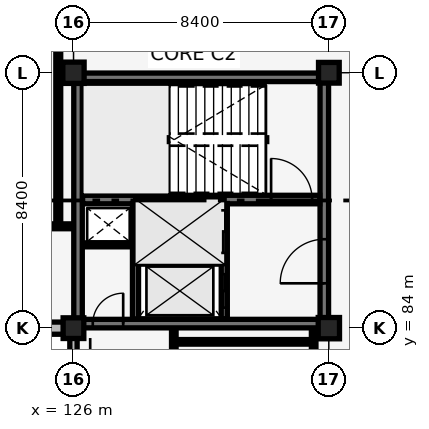
"""IFC4 building model, lengths in metres.
Left out: names, types, materials, properties, quantities, classifications, styles, units other than length and angle.
Written with IfcOpenShell. Run it as: python <this file> out.ifc"""

import sys

from ifc_helpers import new_model, si_unit, direction, frame, frame_2d, origin, origin_2d, place, context, subcontext, project, spatial, rectangle, extrude, element, fill, save


model = new_model("IFC4")
c1 = context("Model", 3, precision=1e-05, world=origin(), true_north=direction((0.0, 1.0)))
c2 = subcontext(c1, "Body", "Model", "MODEL_VIEW")
j1 = project(units=[si_unit("LENGTHUNIT", "METRE"), si_unit("PLANEANGLEUNIT", "RADIAN")], contexts=[c1])
p1 = place(None, origin())
s1 = spatial("IfcSite", under=j1, at=p1, CompositionType="ELEMENT")
p2 = place(p1, origin())
s2 = spatial("IfcBuilding", under=s1, at=p2, CompositionType="ELEMENT")
p3 = place(p2, frame((0.0, 0.0, 9.86)))
s3 = spatial("IfcBuildingStorey", under=s2, at=p3, CompositionType="ELEMENT", Elevation=9.86)
p4 = place(p3, frame((126.15, 84.15, 0.0), z_axis=(0.0, 0.0, 1.0), x_axis=(1.0, 0.0, 0.0)))
e1 = element("IfcWall", 1, at=p4, inside=s3, PredefinedType="SHEAR", context=c2, shape_type="SweptSolid", body=[
    extrude(rectangle(XDim=8.1, YDim=0.28, at=frame_2d((4.05, 0.0))), origin(), (0.0, 0.0, 1.0), 3.78),
])
p5 = place(p4, frame((0.485, 0.0, 0.0)))
e2 = element("IfcOpeningElement", 2, at=p5, cuts=e1, PredefinedType="OPENING", context=c2, shape_type="SweptSolid", body=[
    extrude(rectangle(XDim=1.0, YDim=2.15, at=frame_2d((0.5, 1.075))), frame((0.0, 0.15, 0.0), z_axis=(0.0, -1.0, 0.0), x_axis=(1.0, 0.0, 0.0)), (0.0, 0.0, 1.0), 0.3),
])
for number, where, z_axis, x_axis in (
    (3, (126.15, 92.25, 0.0), (0.0, 0.0, 1.0), (1.0, 0.0, 0.0)),
    (4, (126.15, 84.15, 0.0), (0.0, 0.0, 1.0), (0.0, 1.0, 0.0)),
):
    element("IfcWall", number, at=place(p3, frame(where, z_axis=z_axis, x_axis=x_axis)), inside=s3, PredefinedType="SHEAR", context=c2, shape_type="SweptSolid", body=[
        extrude(rectangle(XDim=8.1, YDim=0.28, at=frame_2d((4.05, 0.0))), origin(), (0.0, 0.0, 1.0), 3.78),
    ])
p6 = place(p3, frame((134.25, 84.15, 0.0), z_axis=(0.0, 0.0, 1.0), x_axis=(0.0, 1.0, 0.0)))
e5 = element("IfcWall", 5, at=p6, inside=s3, PredefinedType="SHEAR", context=c2, shape_type="SweptSolid", body=[
    extrude(rectangle(XDim=8.1, YDim=0.28, at=frame_2d((4.05, 0.0))), origin(), (0.0, 0.0, 1.0), 3.78),
])
p7 = place(p6, frame((1.325, 0.0, 0.0)))
e6 = element("IfcOpeningElement", 6, at=p7, cuts=e5, PredefinedType="OPENING", context=c2, shape_type="SweptSolid", body=[
    extrude(rectangle(XDim=1.45, YDim=2.15, at=frame_2d((0.725, 1.075))), frame((0.0, 0.15, 0.0), z_axis=(0.0, -1.0, 0.0), x_axis=(1.0, 0.0, 0.0)), (0.0, 0.0, 1.0), 0.3),
])
p8 = place(p3, frame((126.3, 88.23, 0.0), z_axis=(0.0, 0.0, 1.0), x_axis=(1.0, 0.0, 0.0)))
e7 = element("IfcWall", 7, at=p8, inside=s3, PredefinedType="SHEAR", context=c2, shape_type="SweptSolid", body=[
    extrude(rectangle(XDim=7.8, YDim=0.28, at=frame_2d((3.9, 0.0))), origin(), (0.0, 0.0, 1.0), 3.78),
])
p9 = place(p8, frame((6.2, 0.0, 0.0)))
e8 = element("IfcOpeningElement", 8, at=p9, cuts=e7, PredefinedType="OPENING", context=c2, shape_type="SweptSolid", body=[
    extrude(rectangle(XDim=1.35, YDim=2.15, at=frame_2d((0.675, 1.075))), frame((0.0, 0.15, 0.0), z_axis=(0.0, -1.0, 0.0), x_axis=(1.0, 0.0, 0.0)), (0.0, 0.0, 1.0), 0.3),
])
p10 = place(p3, frame((126.0, 84.0, 0.0), z_axis=(0.0, 0.0, 1.0), x_axis=(1.0, 0.0, 0.0)))
e9 = element("IfcColumn", 9, at=p10, inside=s3, PredefinedType="COLUMN", context=c2, shape_type="SweptSolid", body=[
    extrude(rectangle(XDim=0.68, YDim=0.68, at=origin_2d()), origin(), (0.0, 0.0, 1.0), 3.78),
])
for number, where, z_axis, x_axis in (
    (10, (126.0, 92.4, 0.0), (0.0, 0.0, 1.0), (1.0, 0.0, 0.0)),
    (11, (134.4, 84.0, 0.0), (0.0, 0.0, 1.0), (1.0, 0.0, 0.0)),
):
    element("IfcColumn", number, at=place(p3, frame(where, z_axis=z_axis, x_axis=x_axis)), inside=s3, PredefinedType="COLUMN", context=c2, shape_type="SweptSolid", body=[
        extrude(rectangle(XDim=0.7, YDim=0.7, at=origin_2d()), origin(), (0.0, 0.0, 1.0), 3.78),
    ])
p11 = place(p3, frame((134.4, 92.4, 0.0), z_axis=(0.0, 0.0, 1.0), x_axis=(1.0, 0.0, 0.0)))
e12 = element("IfcColumn", 12, at=p11, inside=s3, PredefinedType="COLUMN", context=c2, shape_type="SweptSolid", body=[
    extrude(rectangle(XDim=0.68, YDim=0.68, at=origin_2d()), origin(), (0.0, 0.0, 1.0), 3.78),
])
p12 = place(p3, frame((117.885, 84.0, 0.0), z_axis=(0.0, 0.0, 1.0), x_axis=(1.0, 0.0, 0.0)))
e13 = element("IfcWall", 13, at=p12, inside=s3, PredefinedType="SOLIDWALL", context=c2, shape_type="SweptSolid", body=[
    extrude(rectangle(XDim=7.79, YDim=0.4, at=frame_2d((3.895, 0.0))), origin(), (0.0, 0.0, 1.0), 3.01),
])
p13 = place(p12, frame((1.105, 0.0, 0.7)))
e14 = element("IfcOpeningElement", 14, at=p13, cuts=e13, PredefinedType="OPENING", context=c2, shape_type="SweptSolid", body=[
    extrude(rectangle(XDim=0.75, YDim=2.1, at=frame_2d((0.375, 1.05))), frame((0.0, 0.21, 0.0), z_axis=(0.0, -1.0, 0.0), x_axis=(1.0, 0.0, 0.0)), (0.0, 0.0, 1.0), 0.42),
])
p14 = place(p12, frame((2.663, 0.0, 0.7)))
e15 = element("IfcOpeningElement", 15, at=p14, cuts=e13, PredefinedType="OPENING", context=c2, shape_type="SweptSolid", body=[
    extrude(rectangle(XDim=0.75, YDim=2.1, at=frame_2d((0.375, 1.05))), frame((0.0, 0.21, 0.0), z_axis=(0.0, -1.0, 0.0), x_axis=(1.0, 0.0, 0.0)), (0.0, 0.0, 1.0), 0.42),
])
p15 = place(p12, frame((4.377, 0.0, 0.7)))
e16 = element("IfcOpeningElement", 16, at=p15, cuts=e13, PredefinedType="OPENING", context=c2, shape_type="SweptSolid", body=[
    extrude(rectangle(XDim=0.75, YDim=2.1, at=frame_2d((0.375, 1.05))), frame((0.0, 0.21, 0.0), z_axis=(0.0, -1.0, 0.0), x_axis=(1.0, 0.0, 0.0)), (0.0, 0.0, 1.0), 0.42),
])
p16 = place(p12, frame((5.935, 0.0, 0.7)))
e17 = element("IfcOpeningElement", 17, at=p16, cuts=e13, PredefinedType="OPENING", context=c2, shape_type="SweptSolid", body=[
    extrude(rectangle(XDim=0.75, YDim=2.1, at=frame_2d((0.375, 1.05))), frame((0.0, 0.21, 0.0), z_axis=(0.0, -1.0, 0.0), x_axis=(1.0, 0.0, 0.0)), (0.0, 0.0, 1.0), 0.42),
])
p17 = place(p3, frame((126.0, 75.935, 0.0), z_axis=(0.0, 0.0, 1.0), x_axis=(0.0, 1.0, 0.0)))
e18 = element("IfcWall", 18, at=p17, inside=s3, PredefinedType="SOLIDWALL", context=c2, shape_type="SweptSolid", body=[
    extrude(rectangle(XDim=7.74, YDim=0.24, at=frame_2d((3.87, 0.0))), origin(), (0.0, 0.0, 1.0), 3.0),
])
p18 = place(p17, frame((0.794, 0.0, 0.35)))
e19 = element("IfcOpeningElement", 19, at=p18, cuts=e18, PredefinedType="OPENING", context=c2, shape_type="SweptSolid", body=[
    extrude(rectangle(XDim=0.44, YDim=1.25, at=frame_2d((0.22, 0.625))), frame((0.0, 0.13, 0.0), z_axis=(0.0, -1.0, 0.0), x_axis=(1.0, 0.0, 0.0)), (0.0, 0.0, 1.0), 0.26),
])
p19 = place(p17, frame((2.222, 0.0, 0.35)))
e20 = element("IfcOpeningElement", 20, at=p19, cuts=e18, PredefinedType="OPENING", context=c2, shape_type="SweptSolid", body=[
    extrude(rectangle(XDim=0.44, YDim=1.25, at=frame_2d((0.22, 0.625))), frame((0.0, 0.13, 0.0), z_axis=(0.0, -1.0, 0.0), x_axis=(1.0, 0.0, 0.0)), (0.0, 0.0, 1.0), 0.26),
])
p20 = place(p17, frame((3.65, 0.0, 0.35)))
e21 = element("IfcOpeningElement", 21, at=p20, cuts=e18, PredefinedType="OPENING", context=c2, shape_type="SweptSolid", body=[
    extrude(rectangle(XDim=0.44, YDim=1.25, at=frame_2d((0.22, 0.625))), frame((0.0, 0.13, 0.0), z_axis=(0.0, -1.0, 0.0), x_axis=(1.0, 0.0, 0.0)), (0.0, 0.0, 1.0), 0.26),
])
p21 = place(p17, frame((5.078, 0.0, 0.35)))
e22 = element("IfcOpeningElement", 22, at=p21, cuts=e18, PredefinedType="OPENING", context=c2, shape_type="SweptSolid", body=[
    extrude(rectangle(XDim=0.44, YDim=1.25, at=frame_2d((0.22, 0.625))), frame((0.0, 0.13, 0.0), z_axis=(0.0, -1.0, 0.0), x_axis=(1.0, 0.0, 0.0)), (0.0, 0.0, 1.0), 0.26),
])
p22 = place(p17, frame((6.506, 0.0, 0.35)))
e23 = element("IfcOpeningElement", 23, at=p22, cuts=e18, PredefinedType="OPENING", context=c2, shape_type="SweptSolid", body=[
    extrude(rectangle(XDim=0.44, YDim=1.25, at=frame_2d((0.22, 0.625))), frame((0.0, 0.13, 0.0), z_axis=(0.0, -1.0, 0.0), x_axis=(1.0, 0.0, 0.0)), (0.0, 0.0, 1.0), 0.26),
])
p23 = place(p3, frame((130.96, 84.3, 0.0), z_axis=(0.0, 0.0, 1.0), x_axis=(0.0, 1.0, 0.0)))
e24 = element("IfcWall", 24, at=p23, inside=s3, PredefinedType="SHEAR", context=c2, shape_type="SweptSolid", body=[
    extrude(rectangle(XDim=3.8, YDim=0.2, at=frame_2d((1.9, 0.0))), origin(), (0.0, 0.0, 1.0), 2.91),
])
p24 = place(p23, frame((0.375, 0.0, 0.0)))
e25 = element("IfcOpeningElement", 25, at=p24, cuts=e24, PredefinedType="OPENING", context=c2, shape_type="SweptSolid", body=[
    extrude(rectangle(XDim=1.1, YDim=2.15, at=frame_2d((0.55, 1.075))), frame((0.0, 0.11, 0.0), z_axis=(0.0, -1.0, 0.0), x_axis=(1.0, 0.0, 0.0)), (0.0, 0.0, 1.0), 0.22),
])
p25 = place(p23, frame((2.175, 0.0, 0.0)))
e26 = element("IfcOpeningElement", 26, at=p25, cuts=e24, PredefinedType="OPENING", context=c2, shape_type="SweptSolid", body=[
    extrude(rectangle(XDim=1.4, YDim=2.2, at=frame_2d((0.7, 1.1))), frame((0.0, 0.11, 0.0), z_axis=(0.0, -1.0, 0.0), x_axis=(1.0, 0.0, 0.0)), (0.0, 0.0, 1.0), 0.22),
])
p26 = place(p3, frame((128.04, 84.3, 0.0), z_axis=(0.0, 0.0, 1.0), x_axis=(0.0, 1.0, 0.0)))
e27 = element("IfcWall", 27, at=p26, inside=s3, PredefinedType="SHEAR", context=c2, shape_type="SweptSolid", body=[
    extrude(rectangle(XDim=3.8, YDim=0.2, at=frame_2d((1.9, 0.0))), origin(), (0.0, 0.0, 1.0), 2.91),
])
p27 = place(p3, frame((128.15, 86.2, 0.0), z_axis=(0.0, 0.0, 1.0), x_axis=(1.0, 0.0, 0.0)))
e28 = element("IfcWall", 28, at=p27, inside=s3, PredefinedType="SHEAR", context=c2, shape_type="SweptSolid", body=[
    extrude(rectangle(XDim=2.7, YDim=0.18, at=frame_2d((1.35, 0.0))), origin(), (0.0, 0.0, 1.0), 3.78),
])
p28 = place(p3, frame((126.32, 86.74, 0.0), z_axis=(0.0, 0.0, 1.0), x_axis=(1.0, 0.0, 0.0)))
e29 = element("IfcWall", 29, at=p28, inside=s3, PredefinedType="PARTITIONING", context=c2, shape_type="SweptSolid", body=[
    extrude(rectangle(XDim=1.62, YDim=0.13, at=frame_2d((0.81, 0.0))), origin(), (0.0, 0.0, 1.0), 3.78),
])
p29 = place(p3, frame((129.45, 83.55, 0.0), z_axis=(0.0, 0.0, 1.0), x_axis=(1.0, 0.0, 0.0)))
e30 = element("IfcWall", 30, at=p29, inside=s3, PredefinedType="PARTITIONING", context=c2, shape_type="SweptSolid", body=[
    extrude(rectangle(XDim=4.3, YDim=0.15, at=frame_2d((2.15, 0.0))), origin(), (0.0, 0.0, 1.0), 3.78),
])
for number, where, z_axis, x_axis in (
    (31, (129.3, 36.7, 0.0), (0.0, 0.0, 1.0), (0.0, 1.0, 0.0)),
    (32, (133.9, 36.7, 0.0), (0.0, 0.0, 1.0), (0.0, 1.0, 0.0)),
):
    element("IfcWall", number, at=place(p3, frame(where, z_axis=z_axis, x_axis=x_axis)), inside=s3, PredefinedType="PARTITIONING", context=c2, shape_type="SweptSolid", body=[
        extrude(rectangle(XDim=47.27, YDim=0.15, at=frame_2d((23.635, 0.0))), origin(), (0.0, 0.0, 1.0), 2.91),
    ])
p30 = place(p3, frame((109.23, 87.35, 0.0), z_axis=(0.0, 0.0, 1.0), x_axis=(1.0, 0.0, 0.0)))
e33 = element("IfcWall", 33, at=p30, inside=s3, PredefinedType="PARTITIONING", context=c2, shape_type="SweptSolid", body=[
    extrude(rectangle(XDim=16.74, YDim=0.16, at=frame_2d((8.37, 0.0))), origin(), (0.0, 0.0, 1.0), 2.95),
])
p31 = place(p30, frame((7.72, 0.0, 0.0)))
e34 = element("IfcOpeningElement", 34, at=p31, cuts=e33, PredefinedType="OPENING", context=c2, shape_type="SweptSolid", body=[
    extrude(rectangle(XDim=1.3, YDim=2.2, at=frame_2d((0.65, 1.1))), frame((0.0, 0.09, 0.0), z_axis=(0.0, -1.0, 0.0), x_axis=(1.0, 0.0, 0.0)), (0.0, 0.0, 1.0), 0.18),
])
p32 = place(p3, frame((125.5, 87.5, 0.0), z_axis=(0.0, 0.0, 1.0), x_axis=(0.0, 1.0, 0.0)))
e35 = element("IfcWall", 35, at=p32, inside=s3, PredefinedType="PARTITIONING", context=c2, shape_type="SweptSolid", body=[
    extrude(rectangle(XDim=29.92, YDim=0.16, at=frame_2d((14.96, 0.0))), origin(), (0.0, 0.0, 1.0), 2.91),
])
p33 = place(p9, origin())
e36 = element("IfcDoor", 36, at=p33, inside=s3, OperationType="SINGLE_SWING_LEFT", PredefinedType="DOOR", context=c2, shape_type="SweptSolid", body=[
    extrude(rectangle(XDim=1.35, YDim=2.15, at=frame_2d((0.675, 1.075))), frame((0.0, 0.025, 0.0), z_axis=(0.0, -1.0, 0.0), x_axis=(1.0, 0.0, 0.0)), (0.0, 0.0, 1.0), 0.05),
])
fill(e8, e36)
p34 = place(p24, origin())
e37 = element("IfcDoor", 37, at=p34, inside=s3, OperationType="SLIDING_TO_LEFT", PredefinedType="DOOR", context=c2, shape_type="SweptSolid", body=[
    extrude(rectangle(XDim=1.1, YDim=2.15, at=frame_2d((0.55, 1.075))), frame((0.0, 0.025, 0.0), z_axis=(0.0, -1.0, 0.0), x_axis=(1.0, 0.0, 0.0)), (0.0, 0.0, 1.0), 0.05),
])
fill(e25, e37)
p35 = place(p25, origin())
e38 = element("IfcDoor", 38, at=p35, inside=s3, OperationType="SLIDING_TO_LEFT", PredefinedType="DOOR", context=c2, shape_type="SweptSolid", body=[
    extrude(rectangle(XDim=1.4, YDim=2.2, at=frame_2d((0.7, 1.1))), frame((0.0, 0.025, 0.0), z_axis=(0.0, -1.0, 0.0), x_axis=(1.0, 0.0, 0.0)), (0.0, 0.0, 1.0), 0.05),
])
fill(e26, e38)
p36 = place(p7, origin())
e39 = element("IfcDoor", 39, at=p36, inside=s3, OperationType="DOUBLE_DOOR_SINGLE_SWING", PredefinedType="DOOR", context=c2, shape_type="SweptSolid", body=[
    extrude(rectangle(XDim=1.45, YDim=2.15, at=frame_2d((0.725, 1.075))), frame((0.0, 0.025, 0.0), z_axis=(0.0, -1.0, 0.0), x_axis=(1.0, 0.0, 0.0)), (0.0, 0.0, 1.0), 0.05),
])
fill(e6, e39)
p37 = place(p5, origin())
e40 = element("IfcDoor", 40, at=p37, inside=s3, OperationType="SINGLE_SWING_RIGHT", PredefinedType="DOOR", context=c2, shape_type="SweptSolid", body=[
    extrude(rectangle(XDim=1.0, YDim=2.15, at=frame_2d((0.5, 1.075))), frame((0.0, 0.025, 0.0), z_axis=(0.0, -1.0, 0.0), x_axis=(1.0, 0.0, 0.0)), (0.0, 0.0, 1.0), 0.05),
])
fill(e2, e40)
save(model, sys.argv[1])
